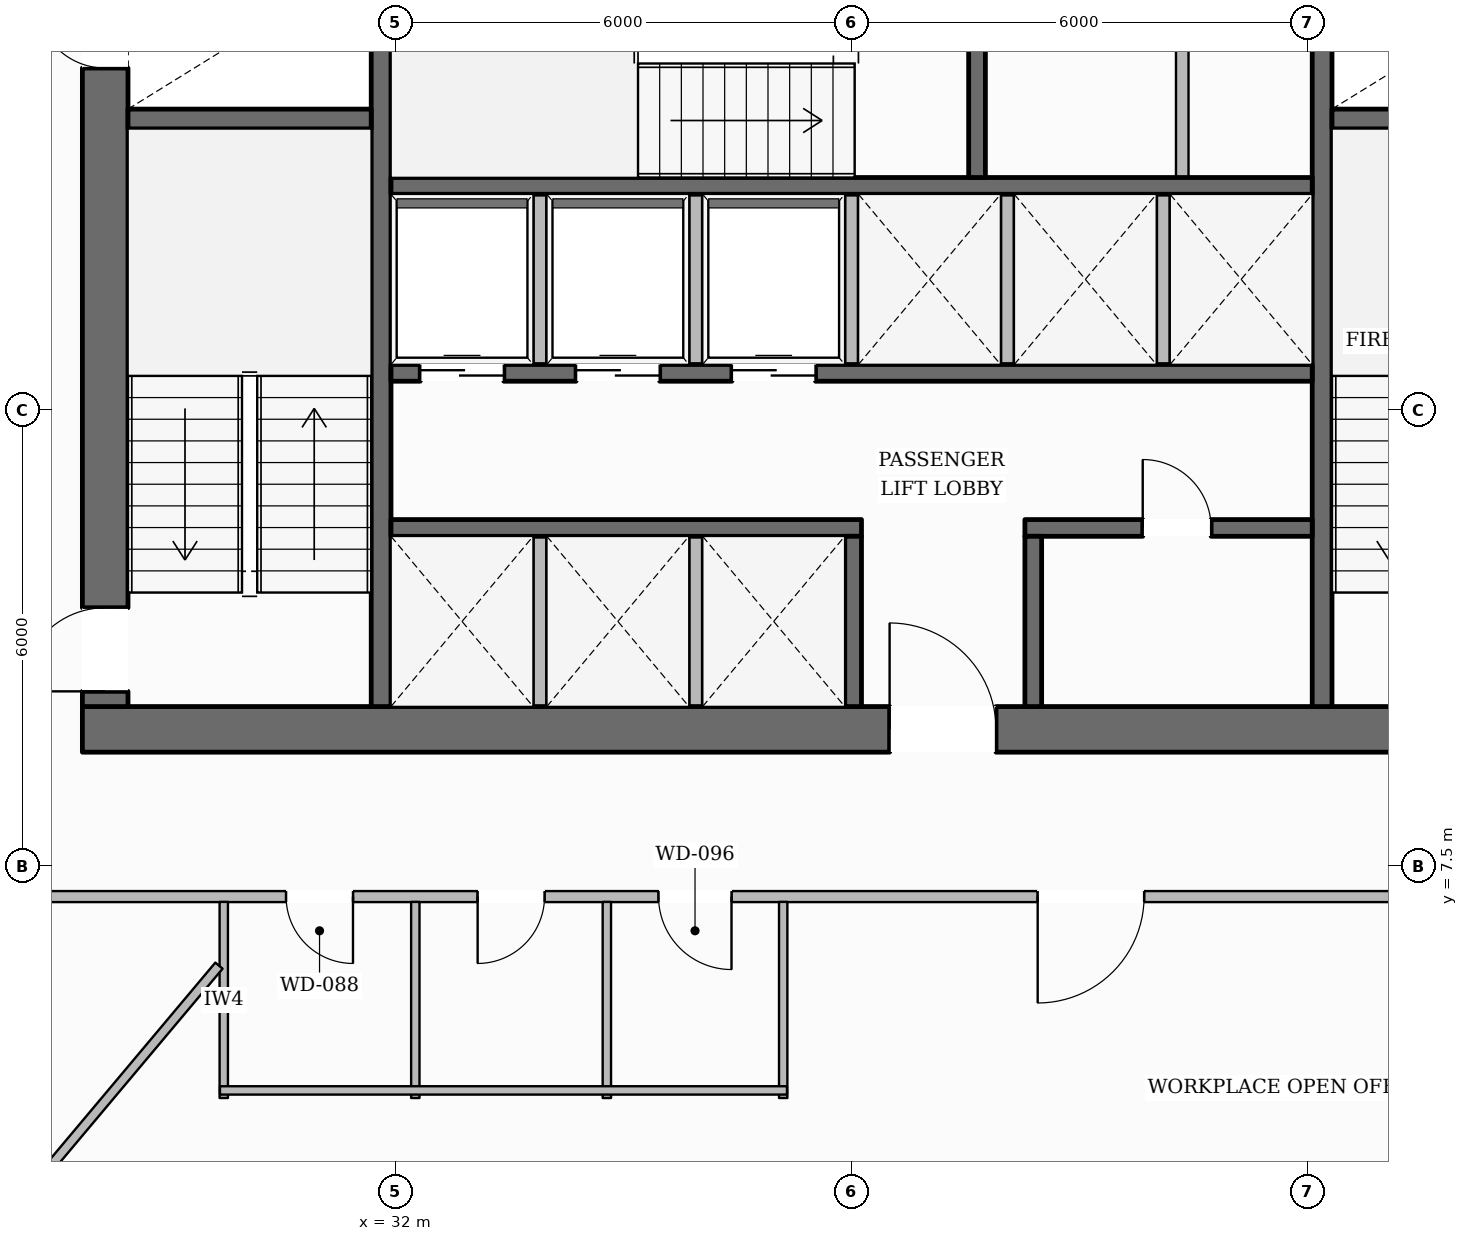
"""IFC4 building model, lengths in metres.
Left out: names, types, materials, properties, quantities, classifications, styles, units other than length and angle.
Written with IfcOpenShell. Run it as: python <this file> out.ifc"""

import sys

from ifc_helpers import new_model, si_unit, direction, frame, frame_2d, origin, place, context, subcontext, project, spatial, rectangle, extrude, element, fill, save


model = new_model("IFC4")
c1 = context("Model", 3, precision=1e-05, world=origin(), true_north=direction((0.0, 1.0)))
c2 = subcontext(c1, "Body", "Model", "MODEL_VIEW")
j1 = project(units=[si_unit("LENGTHUNIT", "METRE"), si_unit("PLANEANGLEUNIT", "RADIAN")], contexts=[c1])
p1 = place(None, origin())
s1 = spatial("IfcSite", under=j1, at=p1, CompositionType="ELEMENT")
p2 = place(p1, origin())
s2 = spatial("IfcBuilding", under=s1, at=p2, CompositionType="ELEMENT")
p3 = place(p2, frame((0.0, 0.0, 71.45)))
s3 = spatial("IfcBuildingStorey", under=s2, at=p3, CompositionType="ELEMENT", Elevation=71.45)
p4 = place(p3, frame((27.88, 9.3, 0.0), z_axis=(0.0, 0.0, 1.0), x_axis=(1.0, 0.0, 0.0)))
e1 = element("IfcWall", 1, at=p4, inside=s3, PredefinedType="SOLIDWALL", context=c2, shape_type="SweptSolid", body=[
    extrude(rectangle(XDim=20.24, YDim=0.6, at=frame_2d((10.12, 0.0))), origin(), (0.0, 0.0, 1.0), 3.43),
])
p5 = place(p4, frame((10.62, 0.0, 0.0)))
e2 = element("IfcOpeningElement", 2, at=p5, cuts=e1, PredefinedType="OPENING", context=c2, shape_type="SweptSolid", body=[
    extrude(rectangle(XDim=1.4, YDim=2.2, at=frame_2d((0.7, 1.1))), frame((0.0, 0.31, 0.0), z_axis=(0.0, -1.0, 0.0), x_axis=(1.0, 0.0, 0.0)), (0.0, 0.0, 1.0), 0.62),
])
p6 = place(p3, frame((28.18, 9.6, 0.0), z_axis=(0.0, 0.0, 1.0), x_axis=(0.0, 1.0, 0.0)))
e3 = element("IfcWall", 3, at=p6, inside=s3, PredefinedType="SOLIDWALL", context=c2, shape_type="SweptSolid", body=[
    extrude(rectangle(XDim=13.0, YDim=0.6, at=frame_2d((6.5, 0.0))), origin(), (0.0, 0.0, 1.0), 3.43),
])
p7 = place(p6, frame((0.2, 0.0, 0.0)))
e4 = element("IfcOpeningElement", 4, at=p7, cuts=e3, PredefinedType="OPENING", context=c2, shape_type="SweptSolid", body=[
    extrude(rectangle(XDim=1.1, YDim=2.15, at=frame_2d((0.55, 1.075))), frame((0.0, 0.31, 0.0), z_axis=(0.0, -1.0, 0.0), x_axis=(1.0, 0.0, 0.0)), (0.0, 0.0, 1.0), 0.62),
])
p8 = place(p6, frame((8.4, 0.0, 0.0)))
e5 = element("IfcOpeningElement", 5, at=p8, cuts=e3, PredefinedType="OPENING", context=c2, shape_type="SweptSolid", body=[
    extrude(rectangle(XDim=0.9, YDim=2.1, at=frame_2d((0.45, 1.05))), frame((0.0, 0.31, 0.0), z_axis=(0.0, -1.0, 0.0), x_axis=(1.0, 0.0, 0.0)), (0.0, 0.0, 1.0), 0.62),
])
p9 = place(p3, frame((31.81, 9.6, 0.0), z_axis=(0.0, 0.0, 1.0), x_axis=(0.0, 1.0, 0.0)))
e6 = element("IfcWall", 6, at=p9, inside=s3, PredefinedType="SHEAR", context=c2, shape_type="SweptSolid", body=[
    extrude(rectangle(XDim=13.0, YDim=0.26, at=frame_2d((6.5, 0.0))), origin(), (0.0, 0.0, 1.0), 3.43),
])
p10 = place(p9, frame((10.925, 0.0, 0.0)))
e7 = element("IfcOpeningElement", 7, at=p10, cuts=e6, PredefinedType="OPENING", context=c2, shape_type="SweptSolid", body=[
    extrude(rectangle(XDim=1.25, YDim=2.25, at=frame_2d((0.625, 1.125))), frame((0.0, 0.14, 0.0), z_axis=(0.0, -1.0, 0.0), x_axis=(1.0, 0.0, 0.0)), (0.0, 0.0, 1.0), 0.28),
])
p11 = place(p3, frame((44.19, 9.6, 0.0), z_axis=(0.0, 0.0, 1.0), x_axis=(0.0, 1.0, 0.0)))
e8 = element("IfcWall", 8, at=p11, inside=s3, PredefinedType="SHEAR", context=c2, shape_type="SweptSolid", body=[
    extrude(rectangle(XDim=13.0, YDim=0.26, at=frame_2d((6.5, 0.0))), origin(), (0.0, 0.0, 1.0), 3.43),
])
p12 = place(p11, frame((10.925, 0.0, 0.0)))
e9 = element("IfcOpeningElement", 9, at=p12, cuts=e8, PredefinedType="OPENING", context=c2, shape_type="SweptSolid", body=[
    extrude(rectangle(XDim=1.25, YDim=2.25, at=frame_2d((0.625, 1.125))), frame((0.0, 0.14, 0.0), z_axis=(0.0, -1.0, 0.0), x_axis=(1.0, 0.0, 0.0)), (0.0, 0.0, 1.0), 0.28),
])
for number, where, z_axis, x_axis in (
    (10, (28.48, 17.33, 0.0), (0.0, 0.0, 1.0), (1.0, 0.0, 0.0)),
    (11, (44.32, 17.33, 0.0), (0.0, 0.0, 1.0), (1.0, 0.0, 0.0)),
):
    element("IfcWall", number, at=place(p3, frame(where, z_axis=z_axis, x_axis=x_axis)), inside=s3, PredefinedType="SHEAR", context=c2, shape_type="SweptSolid", body=[
        extrude(rectangle(XDim=3.2, YDim=0.26, at=frame_2d((1.6, 0.0))), origin(), (0.0, 0.0, 1.0), 3.43),
    ])
p13 = place(p3, frame((31.94, 16.45, 0.0), z_axis=(0.0, 0.0, 1.0), x_axis=(1.0, 0.0, 0.0)))
e12 = element("IfcWall", 12, at=p13, inside=s3, PredefinedType="SOLIDWALL", context=c2, shape_type="SweptSolid", body=[
    extrude(rectangle(XDim=12.12, YDim=0.22, at=frame_2d((6.06, 0.0))), origin(), (0.0, 0.0, 1.0), 3.43),
])
p14 = place(p3, frame((39.65, 16.56, 0.0), z_axis=(0.0, 0.0, 1.0), x_axis=(0.0, 1.0, 0.0)))
e13 = element("IfcWall", 13, at=p14, inside=s3, PredefinedType="SOLIDWALL", context=c2, shape_type="SweptSolid", body=[
    extrude(rectangle(XDim=3.2, YDim=0.22, at=frame_2d((1.6, 0.0))), origin(), (0.0, 0.0, 1.0), 3.43),
])
p15 = place(p3, frame((31.94, 13.99, 0.0), z_axis=(0.0, 0.0, 1.0), x_axis=(1.0, 0.0, 0.0)))
e14 = element("IfcWall", 14, at=p15, inside=s3, PredefinedType="SOLIDWALL", context=c2, shape_type="SweptSolid", body=[
    extrude(rectangle(XDim=12.12, YDim=0.22, at=frame_2d((6.06, 0.0))), origin(), (0.0, 0.0, 1.0), 3.43),
])
p16 = place(p15, frame((0.385, 0.0, 0.0)))
e15 = element("IfcOpeningElement", 15, at=p16, cuts=e14, PredefinedType="OPENING", context=c2, shape_type="SweptSolid", body=[
    extrude(rectangle(XDim=1.1, YDim=2.2, at=frame_2d((0.55, 1.1))), frame((0.0, 0.12, 0.0), z_axis=(0.0, -1.0, 0.0), x_axis=(1.0, 0.0, 0.0)), (0.0, 0.0, 1.0), 0.24),
])
p17 = place(p15, frame((2.435, 0.0, 0.0)))
e16 = element("IfcOpeningElement", 16, at=p17, cuts=e14, PredefinedType="OPENING", context=c2, shape_type="SweptSolid", body=[
    extrude(rectangle(XDim=1.1, YDim=2.2, at=frame_2d((0.55, 1.1))), frame((0.0, 0.12, 0.0), z_axis=(0.0, -1.0, 0.0), x_axis=(1.0, 0.0, 0.0)), (0.0, 0.0, 1.0), 0.24),
])
p18 = place(p15, frame((4.485, 0.0, 0.0)))
e17 = element("IfcOpeningElement", 17, at=p18, cuts=e14, PredefinedType="OPENING", context=c2, shape_type="SweptSolid", body=[
    extrude(rectangle(XDim=1.1, YDim=2.2, at=frame_2d((0.55, 1.1))), frame((0.0, 0.12, 0.0), z_axis=(0.0, -1.0, 0.0), x_axis=(1.0, 0.0, 0.0)), (0.0, 0.0, 1.0), 0.24),
])
p19 = place(p3, frame((31.94, 11.95, 0.0), z_axis=(0.0, 0.0, 1.0), x_axis=(1.0, 0.0, 0.0)))
e18 = element("IfcWall", 18, at=p19, inside=s3, PredefinedType="SOLIDWALL", context=c2, shape_type="SweptSolid", body=[
    extrude(rectangle(XDim=6.19, YDim=0.22, at=frame_2d((3.095, 0.0))), origin(), (0.0, 0.0, 1.0), 3.43),
])
p20 = place(p3, frame((40.28, 11.95, 0.0), z_axis=(0.0, 0.0, 1.0), x_axis=(1.0, 0.0, 0.0)))
e19 = element("IfcWall", 19, at=p20, inside=s3, PredefinedType="SOLIDWALL", context=c2, shape_type="SweptSolid", body=[
    extrude(rectangle(XDim=3.78, YDim=0.22, at=frame_2d((1.89, 0.0))), origin(), (0.0, 0.0, 1.0), 3.43),
])
p21 = place(p20, frame((1.55, 0.0, 0.0)))
e20 = element("IfcOpeningElement", 20, at=p21, cuts=e19, PredefinedType="OPENING", context=c2, shape_type="SweptSolid", body=[
    extrude(rectangle(XDim=0.9, YDim=2.1, at=frame_2d((0.45, 1.05))), frame((0.0, 0.12, 0.0), z_axis=(0.0, -1.0, 0.0), x_axis=(1.0, 0.0, 0.0)), (0.0, 0.0, 1.0), 0.24),
])
for number, where, z_axis, x_axis in (
    (21, (38.02, 9.6, 0.0), (0.0, 0.0, 1.0), (0.0, 1.0, 0.0)),
    (22, (40.39, 9.6, 0.0), (0.0, 0.0, 1.0), (0.0, 1.0, 0.0)),
):
    element("IfcWall", number, at=place(p3, frame(where, z_axis=z_axis, x_axis=x_axis)), inside=s3, PredefinedType="SOLIDWALL", context=c2, shape_type="SweptSolid", body=[
        extrude(rectangle(XDim=2.24, YDim=0.22, at=frame_2d((1.12, 0.0))), origin(), (0.0, 0.0, 1.0), 3.43),
    ])
p22 = place(p3, frame((12.473, 13.275, 0.0), z_axis=(0.0, 0.0, 1.0), x_axis=(0.504426765764, 0.863454479391, 0.0)))
e23 = element("IfcWall", 23, at=p22, inside=s3, PredefinedType="STANDARD", context=c2, shape_type="SweptSolid", body=[
    extrude(rectangle(XDim=36.594, YDim=0.38, at=frame_2d((18.297, 0.0))), origin(), (0.0, 0.0, 1.0), 2.81),
])
p23 = place(p22, frame((8.749, 0.0, 0.0)))
e24 = element("IfcOpeningElement", 24, at=p23, cuts=e23, PredefinedType="OPENING", context=c2, shape_type="SweptSolid", body=[
    extrude(rectangle(XDim=1.0, YDim=2.2, at=frame_2d((0.5, 1.1))), frame((0.0, 0.2, 0.0), z_axis=(0.0, -1.0, 0.0), x_axis=(1.0, 0.0, 0.0)), (0.0, 0.0, 1.0), 0.4),
])
p24 = place(p22, frame((32.326, 0.0, 0.55)))
e25 = element("IfcOpeningElement", 25, at=p24, cuts=e23, PredefinedType="OPENING", context=c2, shape_type="SweptSolid", body=[
    extrude(rectangle(XDim=1.65, YDim=1.6, at=frame_2d((0.825, 0.8))), frame((0.0, 0.2, 0.0), z_axis=(0.0, -1.0, 0.0), x_axis=(1.0, 0.0, 0.0)), (0.0, 0.0, 1.0), 0.4),
])
p25 = place(p22, frame((26.385, 0.0, 0.55)))
e26 = element("IfcOpeningElement", 26, at=p25, cuts=e23, PredefinedType="OPENING", context=c2, shape_type="SweptSolid", body=[
    extrude(rectangle(XDim=1.65, YDim=1.6, at=frame_2d((0.825, 0.8))), frame((0.0, 0.2, 0.0), z_axis=(0.0, -1.0, 0.0), x_axis=(1.0, 0.0, 0.0)), (0.0, 0.0, 1.0), 0.4),
])
p26 = place(p22, frame((20.445, 0.0, 0.55)))
e27 = element("IfcOpeningElement", 27, at=p26, cuts=e23, PredefinedType="OPENING", context=c2, shape_type="SweptSolid", body=[
    extrude(rectangle(XDim=1.65, YDim=1.6, at=frame_2d((0.825, 0.8))), frame((0.0, 0.2, 0.0), z_axis=(0.0, -1.0, 0.0), x_axis=(1.0, 0.0, 0.0)), (0.0, 0.0, 1.0), 0.4),
])
p27 = place(p22, frame((2.624, 0.0, 0.55)))
e28 = element("IfcOpeningElement", 28, at=p27, cuts=e23, PredefinedType="OPENING", context=c2, shape_type="SweptSolid", body=[
    extrude(rectangle(XDim=1.65, YDim=1.6, at=frame_2d((0.825, 0.8))), frame((0.0, 0.2, 0.0), z_axis=(0.0, -1.0, 0.0), x_axis=(1.0, 0.0, 0.0)), (0.0, 0.0, 1.0), 0.4),
])
p28 = place(p3, frame((44.918, 44.961, 0.0), z_axis=(0.0, 0.0, 1.0), x_axis=(0.499266462474, -0.866448497863, 0.0)))
e29 = element("IfcWall", 29, at=p28, inside=s3, PredefinedType="STANDARD", context=c2, shape_type="SweptSolid", body=[
    extrude(rectangle(XDim=36.221, YDim=0.38, at=frame_2d((18.11, 0.0))), origin(), (0.0, 0.0, 1.0), 2.81),
])
p29 = place(p28, frame((31.979, 0.0, 0.55)))
e30 = element("IfcOpeningElement", 30, at=p29, cuts=e29, PredefinedType="OPENING", context=c2, shape_type="SweptSolid", body=[
    extrude(rectangle(XDim=1.65, YDim=1.6, at=frame_2d((0.825, 0.8))), frame((0.0, 0.2, 0.0), z_axis=(0.0, -1.0, 0.0), x_axis=(1.0, 0.0, 0.0)), (0.0, 0.0, 1.0), 0.4),
])
p30 = place(p28, frame((26.102, 0.0, 0.55)))
e31 = element("IfcOpeningElement", 31, at=p30, cuts=e29, PredefinedType="OPENING", context=c2, shape_type="SweptSolid", body=[
    extrude(rectangle(XDim=1.65, YDim=1.6, at=frame_2d((0.825, 0.8))), frame((0.0, 0.2, 0.0), z_axis=(0.0, -1.0, 0.0), x_axis=(1.0, 0.0, 0.0)), (0.0, 0.0, 1.0), 0.4),
])
p31 = place(p28, frame((20.224, 0.0, 0.55)))
e32 = element("IfcOpeningElement", 32, at=p31, cuts=e29, PredefinedType="OPENING", context=c2, shape_type="SweptSolid", body=[
    extrude(rectangle(XDim=1.65, YDim=1.6, at=frame_2d((0.825, 0.8))), frame((0.0, 0.2, 0.0), z_axis=(0.0, -1.0, 0.0), x_axis=(1.0, 0.0, 0.0)), (0.0, 0.0, 1.0), 0.4),
])
p32 = place(p28, frame((8.47, 0.0, 0.55)))
e33 = element("IfcOpeningElement", 33, at=p32, cuts=e29, PredefinedType="OPENING", context=c2, shape_type="SweptSolid", body=[
    extrude(rectangle(XDim=1.65, YDim=1.6, at=frame_2d((0.825, 0.8))), frame((0.0, 0.2, 0.0), z_axis=(0.0, -1.0, 0.0), x_axis=(1.0, 0.0, 0.0)), (0.0, 0.0, 1.0), 0.4),
])
p33 = place(p28, frame((2.593, 0.0, 0.55)))
e34 = element("IfcOpeningElement", 34, at=p33, cuts=e29, PredefinedType="OPENING", context=c2, shape_type="SweptSolid", body=[
    extrude(rectangle(XDim=1.65, YDim=1.6, at=frame_2d((0.825, 0.8))), frame((0.0, 0.2, 0.0), z_axis=(0.0, -1.0, 0.0), x_axis=(1.0, 0.0, 0.0)), (0.0, 0.0, 1.0), 0.4),
])
for number, where, z_axis, x_axis in (
    (35, (33.9, 9.6, 0.0), (0.0, 0.0, 1.0), (0.0, 1.0, 0.0)),
    (36, (35.95, 9.6, 0.0), (0.0, 0.0, 1.0), (0.0, 1.0, 0.0)),
    (37, (33.9, 14.1, 0.0), (0.0, 0.0, 1.0), (0.0, 1.0, 0.0)),
    (38, (35.95, 14.1, 0.0), (0.0, 0.0, 1.0), (0.0, 1.0, 0.0)),
    (39, (38.0, 14.1, 0.0), (0.0, 0.0, 1.0), (0.0, 1.0, 0.0)),
    (40, (40.05, 14.1, 0.0), (0.0, 0.0, 1.0), (0.0, 1.0, 0.0)),
    (41, (42.1, 14.1, 0.0), (0.0, 0.0, 1.0), (0.0, 1.0, 0.0)),
):
    element("IfcWall", number, at=place(p3, frame(where, z_axis=z_axis, x_axis=x_axis)), inside=s3, PredefinedType="PARTITIONING", context=c2, shape_type="SweptSolid", body=[
        extrude(rectangle(XDim=2.24, YDim=0.165, at=frame_2d((1.12, 0.0))), origin(), (0.0, 0.0, 1.0), 3.43),
    ])
p34 = place(p3, frame((42.35, 16.56, 0.0), z_axis=(0.0, 0.0, 1.0), x_axis=(0.0, 1.0, 0.0)))
e42 = element("IfcWall", 42, at=p34, inside=s3, PredefinedType="PARTITIONING", context=c2, shape_type="SweptSolid", body=[
    extrude(rectangle(XDim=3.2, YDim=0.165, at=frame_2d((1.6, 0.0))), origin(), (0.0, 0.0, 1.0), 3.43),
])
p35 = place(p3, frame((49.92, 7.1, 0.0), z_axis=(0.0, 0.0, 1.0), x_axis=(-1.0, 0.0, 0.0)))
e43 = element("IfcWall", 43, at=p35, inside=s3, PredefinedType="PARTITIONING", context=c2, shape_type="SweptSolid", body=[
    extrude(rectangle(XDim=23.84, YDim=0.145, at=frame_2d((11.92, 0.0))), origin(), (0.0, 0.0, 1.0), 3.118),
])
p36 = place(p35, frame((18.48, 0.0, 0.0)))
e44 = element("IfcOpeningElement", 44, at=p36, cuts=e43, PredefinedType="OPENING", context=c2, shape_type="SweptSolid", body=[
    extrude(rectangle(XDim=0.88, YDim=2.1, at=frame_2d((0.44, 1.05))), frame((0.0, 0.083, 0.0), z_axis=(0.0, -1.0, 0.0), x_axis=(1.0, 0.0, 0.0)), (0.0, 0.0, 1.0), 0.165),
])
p37 = place(p35, frame((15.96, 0.0, 0.0)))
e45 = element("IfcOpeningElement", 45, at=p37, cuts=e43, PredefinedType="OPENING", context=c2, shape_type="SweptSolid", body=[
    extrude(rectangle(XDim=0.88, YDim=2.1, at=frame_2d((0.44, 1.05))), frame((0.0, 0.083, 0.0), z_axis=(0.0, -1.0, 0.0), x_axis=(1.0, 0.0, 0.0)), (0.0, 0.0, 1.0), 0.165),
])
p38 = place(p35, frame((13.5, 0.0, 0.0)))
e46 = element("IfcOpeningElement", 46, at=p38, cuts=e43, PredefinedType="OPENING", context=c2, shape_type="SweptSolid", body=[
    extrude(rectangle(XDim=0.96, YDim=2.1, at=frame_2d((0.48, 1.05))), frame((0.0, 0.083, 0.0), z_axis=(0.0, -1.0, 0.0), x_axis=(1.0, 0.0, 0.0)), (0.0, 0.0, 1.0), 0.165),
])
p39 = place(p35, frame((8.072, 0.0, 0.0)))
e47 = element("IfcOpeningElement", 47, at=p39, cuts=e43, PredefinedType="OPENING", context=c2, shape_type="SweptSolid", body=[
    extrude(rectangle(XDim=1.4, YDim=2.2, at=frame_2d((0.7, 1.1))), frame((0.0, 0.083, 0.0), z_axis=(0.0, -1.0, 0.0), x_axis=(1.0, 0.0, 0.0)), (0.0, 0.0, 1.0), 0.165),
])
for number, where, z_axis, x_axis in (
    (48, (29.74, 4.45, 0.0), (0.0, 0.0, 1.0), (0.0, 1.0, 0.0)),
    (49, (32.26, 4.45, 0.0), (0.0, 0.0, 1.0), (0.0, 1.0, 0.0)),
    (50, (34.78, 4.45, 0.0), (0.0, 0.0, 1.0), (0.0, 1.0, 0.0)),
    (51, (37.1, 4.45, 0.0), (0.0, 0.0, 1.0), (0.0, 1.0, 0.0)),
):
    element("IfcWall", number, at=place(p3, frame(where, z_axis=z_axis, x_axis=x_axis)), inside=s3, PredefinedType="PLUMBINGWALL", context=c2, shape_type="SweptSolid", body=[
        extrude(rectangle(XDim=2.58, YDim=0.11, at=frame_2d((1.29, 0.0))), origin(), (0.0, 0.0, 1.0), 3.43),
    ])
p40 = place(p3, frame((29.69, 4.55, 0.0), z_axis=(0.0, 0.0, 1.0), x_axis=(1.0, 0.0, 0.0)))
e52 = element("IfcWall", 52, at=p40, inside=s3, PredefinedType="PLUMBINGWALL", context=c2, shape_type="SweptSolid", body=[
    extrude(rectangle(XDim=7.46, YDim=0.11, at=frame_2d((3.73, 0.0))), origin(), (0.0, 0.0, 1.0), 3.43),
])
p41 = place(p3, frame((29.677, 6.191, 0.0), z_axis=(0.0, 0.0, 1.0), x_axis=(-0.64317332917, -0.76572062049, 0.0)))
e53 = element("IfcWall", 53, at=p41, inside=s3, PredefinedType="PARTITIONING", context=c2, shape_type="SweptSolid", body=[
    extrude(rectangle(XDim=5.495, YDim=0.125, at=frame_2d((2.747, 0.0))), origin(), (0.0, 0.0, 1.0), 3.43),
])
p42 = place(p7, origin())
e54 = element("IfcDoor", 54, at=p42, inside=s3, OperationType="SINGLE_SWING_LEFT", PredefinedType="DOOR", context=c2, shape_type="SweptSolid", body=[
    extrude(rectangle(XDim=1.1, YDim=2.15, at=frame_2d((0.55, 1.075))), frame((0.0, 0.025, 0.0), z_axis=(0.0, -1.0, 0.0), x_axis=(1.0, 0.0, 0.0)), (0.0, 0.0, 1.0), 0.05),
])
fill(e4, e54)
p43 = place(p8, origin())
e55 = element("IfcDoor", 55, at=p43, inside=s3, OperationType="SINGLE_SWING_RIGHT", PredefinedType="DOOR", context=c2, shape_type="SweptSolid", body=[
    extrude(rectangle(XDim=0.9, YDim=2.1, at=frame_2d((0.45, 1.05))), frame((0.0, 0.025, 0.0), z_axis=(0.0, -1.0, 0.0), x_axis=(1.0, 0.0, 0.0)), (0.0, 0.0, 1.0), 0.05),
])
fill(e5, e55)
p44 = place(p5, origin())
e56 = element("IfcDoor", 56, at=p44, inside=s3, OperationType="SINGLE_SWING_LEFT", PredefinedType="DOOR", context=c2, shape_type="SweptSolid", body=[
    extrude(rectangle(XDim=1.4, YDim=2.2, at=frame_2d((0.7, 1.1))), frame((0.0, 0.025, 0.0), z_axis=(0.0, -1.0, 0.0), x_axis=(1.0, 0.0, 0.0)), (0.0, 0.0, 1.0), 0.05),
])
fill(e2, e56)
p45 = place(p16, origin())
e57 = element("IfcDoor", 57, at=p45, inside=s3, OperationType="DOUBLE_DOOR_SLIDING", PredefinedType="DOOR", context=c2, shape_type="SweptSolid", body=[
    extrude(rectangle(XDim=1.1, YDim=2.2, at=frame_2d((0.55, 1.1))), frame((0.0, 0.025, 0.0), z_axis=(0.0, -1.0, 0.0), x_axis=(1.0, 0.0, 0.0)), (0.0, 0.0, 1.0), 0.05),
])
fill(e15, e57)
p46 = place(p17, origin())
e58 = element("IfcDoor", 58, at=p46, inside=s3, OperationType="DOUBLE_DOOR_SLIDING", PredefinedType="DOOR", context=c2, shape_type="SweptSolid", body=[
    extrude(rectangle(XDim=1.1, YDim=2.2, at=frame_2d((0.55, 1.1))), frame((0.0, 0.025, 0.0), z_axis=(0.0, -1.0, 0.0), x_axis=(1.0, 0.0, 0.0)), (0.0, 0.0, 1.0), 0.05),
])
fill(e16, e58)
p47 = place(p18, origin())
e59 = element("IfcDoor", 59, at=p47, inside=s3, OperationType="DOUBLE_DOOR_SLIDING", PredefinedType="DOOR", context=c2, shape_type="SweptSolid", body=[
    extrude(rectangle(XDim=1.1, YDim=2.2, at=frame_2d((0.55, 1.1))), frame((0.0, 0.025, 0.0), z_axis=(0.0, -1.0, 0.0), x_axis=(1.0, 0.0, 0.0)), (0.0, 0.0, 1.0), 0.05),
])
fill(e17, e59)
p48 = place(p21, origin())
e60 = element("IfcDoor", 60, at=p48, inside=s3, OperationType="SINGLE_SWING_LEFT", PredefinedType="DOOR", context=c2, shape_type="SweptSolid", body=[
    extrude(rectangle(XDim=0.9, YDim=2.1, at=frame_2d((0.45, 1.05))), frame((0.0, 0.025, 0.0), z_axis=(0.0, -1.0, 0.0), x_axis=(1.0, 0.0, 0.0)), (0.0, 0.0, 1.0), 0.05),
])
fill(e20, e60)
p49 = place(p36, origin())
e61 = element("IfcDoor", 61, at=p49, inside=s3, OperationType="SINGLE_SWING_LEFT", PredefinedType="DOOR", context=c2, shape_type="SweptSolid", body=[
    extrude(rectangle(XDim=0.88, YDim=2.1, at=frame_2d((0.44, 1.05))), frame((0.0, 0.025, 0.0), z_axis=(0.0, -1.0, 0.0), x_axis=(1.0, 0.0, 0.0)), (0.0, 0.0, 1.0), 0.05),
])
fill(e44, e61)
p50 = place(p37, origin())
e62 = element("IfcDoor", 62, at=p50, inside=s3, OperationType="SINGLE_SWING_RIGHT", PredefinedType="DOOR", context=c2, shape_type="SweptSolid", body=[
    extrude(rectangle(XDim=0.88, YDim=2.1, at=frame_2d((0.44, 1.05))), frame((0.0, 0.025, 0.0), z_axis=(0.0, -1.0, 0.0), x_axis=(1.0, 0.0, 0.0)), (0.0, 0.0, 1.0), 0.05),
])
fill(e45, e62)
p51 = place(p38, origin())
e63 = element("IfcDoor", 63, at=p51, inside=s3, OperationType="SINGLE_SWING_LEFT", PredefinedType="DOOR", context=c2, shape_type="SweptSolid", body=[
    extrude(rectangle(XDim=0.96, YDim=2.1, at=frame_2d((0.48, 1.05))), frame((0.0, 0.025, 0.0), z_axis=(0.0, -1.0, 0.0), x_axis=(1.0, 0.0, 0.0)), (0.0, 0.0, 1.0), 0.05),
])
fill(e46, e63)
p52 = place(p39, origin())
e64 = element("IfcDoor", 64, at=p52, inside=s3, OperationType="SINGLE_SWING_RIGHT", PredefinedType="DOOR", context=c2, shape_type="SweptSolid", body=[
    extrude(rectangle(XDim=1.4, YDim=2.2, at=frame_2d((0.7, 1.1))), frame((0.0, 0.025, 0.0), z_axis=(0.0, -1.0, 0.0), x_axis=(1.0, 0.0, 0.0)), (0.0, 0.0, 1.0), 0.05),
])
fill(e47, e64)
save(model, sys.argv[1])
